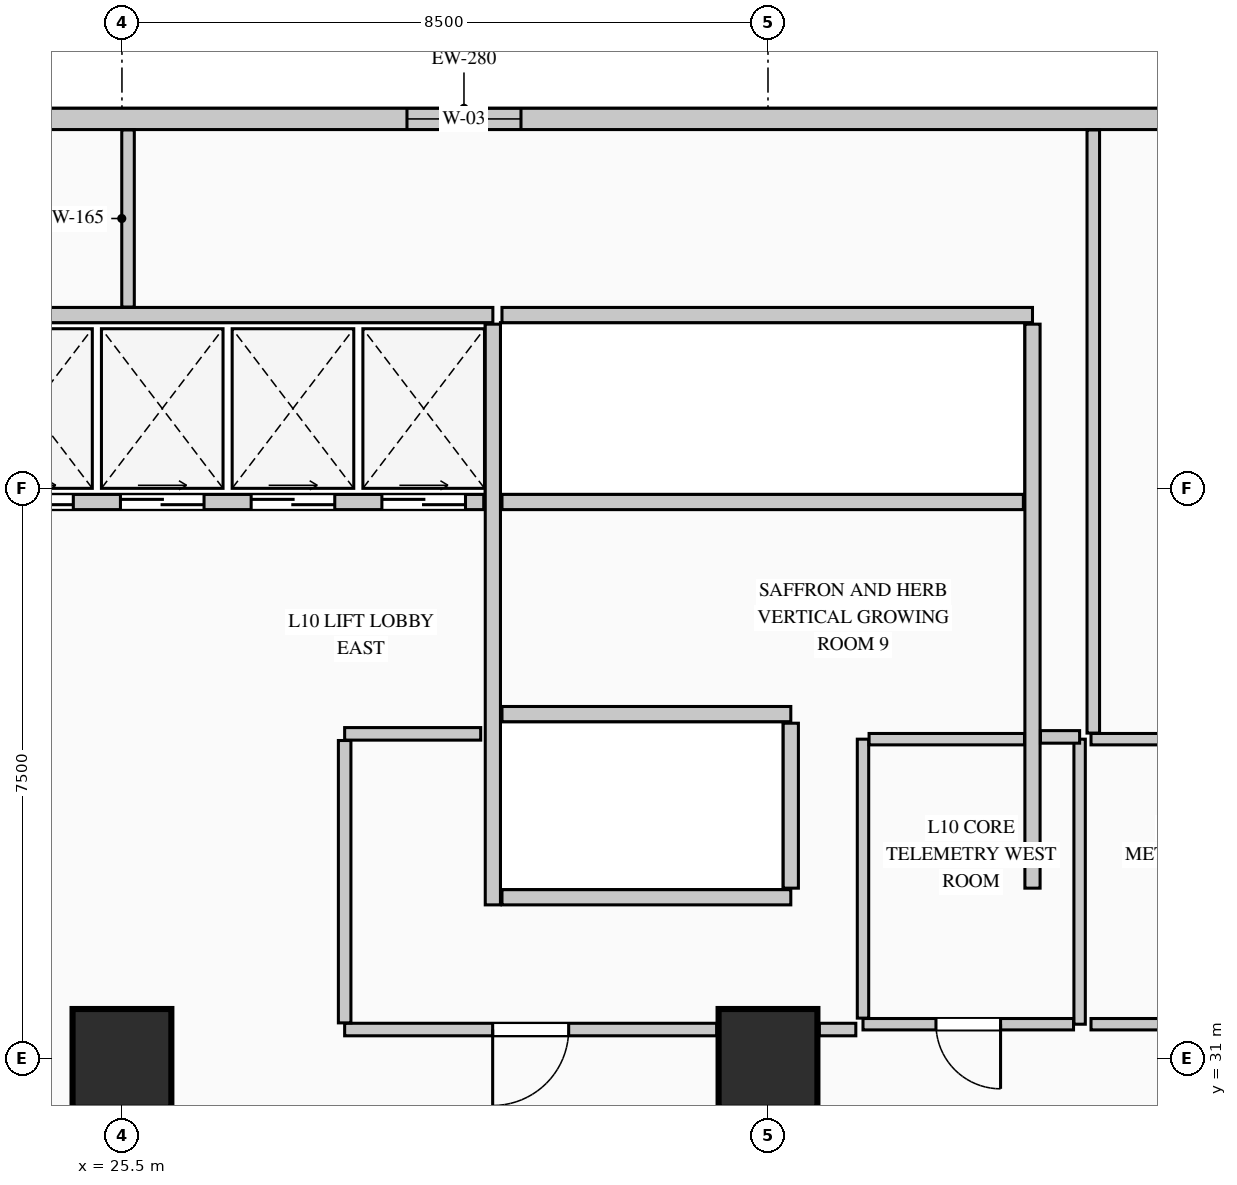
"""IFC4 building model, lengths in metres.
Left out: names, types, materials, properties, quantities, classifications, styles, units other than length and angle.
Written with IfcOpenShell. Run it as: python <this file> out.ifc"""

import sys

from ifc_helpers import new_model, si_unit, direction, frame, frame_2d, origin, origin_2d, place, context, subcontext, project, spatial, rectangle, extrude, element, fill, save


model = new_model("IFC4")
c1 = context("Model", 3, precision=1e-05, world=origin(), true_north=direction((0.0, 1.0)))
c2 = subcontext(c1, "Body", "Model", "MODEL_VIEW")
j1 = project(units=[si_unit("LENGTHUNIT", "METRE"), si_unit("PLANEANGLEUNIT", "RADIAN")], contexts=[c1])
p1 = place(None, origin())
s1 = spatial("IfcSite", under=j1, at=p1, CompositionType="ELEMENT")
p2 = place(p1, origin())
s2 = spatial("IfcBuilding", under=s1, at=p2, CompositionType="ELEMENT")
p3 = place(p2, frame((0.0, 0.0, 44.6)))
s3 = spatial("IfcBuildingStorey", under=s2, at=p3, CompositionType="ELEMENT", Elevation=44.6)
for number, where, z_axis, x_axis in (
    (1, (25.5, 31.0, 0.0), (0.0, 0.0, 1.0), (1.0, 0.0, 0.0)),
    (2, (34.0, 31.0, 0.0), (0.0, 0.0, 1.0), (1.0, 0.0, 0.0)),
):
    element("IfcColumn", number, at=place(p3, frame(where, z_axis=z_axis, x_axis=x_axis)), inside=s3, PredefinedType="COLUMN", context=c2, shape_type="SweptSolid", body=[
        extrude(rectangle(XDim=1.3, YDim=1.3, at=origin_2d()), origin(), (0.0, 0.0, 1.0), 4.4),
    ])
p4 = place(p3, frame((4.84, 43.36, 0.0), z_axis=(0.0, 0.0, 1.0), x_axis=(1.0, 0.0, 0.0)))
e3 = element("IfcWall", 3, at=p4, inside=s3, PredefinedType="STANDARD", context=c2, shape_type="SweptSolid", body=[
    extrude(rectangle(XDim=50.32, YDim=0.28, at=frame_2d((25.16, 0.0))), origin(), (0.0, 0.0, 1.0), 4.1),
])
p5 = place(p4, frame((24.41, 0.0, 0.9)))
e4 = element("IfcOpeningElement", 4, at=p5, cuts=e3, PredefinedType="OPENING", context=c2, shape_type="SweptSolid", body=[
    extrude(rectangle(XDim=1.5, YDim=1.8, at=frame_2d((0.75, 0.9))), frame((0.0, 0.15, 0.0), z_axis=(0.0, -1.0, 0.0), x_axis=(1.0, 0.0, 0.0)), (0.0, 0.0, 1.0), 0.3),
])
p6 = place(p3, frame((23.47, 40.78, 0.0), z_axis=(0.0, 0.0, 1.0), x_axis=(1.0, 0.0, 0.0)))
e5 = element("IfcWall", 5, at=p6, inside=s3, PredefinedType="PARTITIONING", context=c2, shape_type="SweptSolid", body=[
    extrude(rectangle(XDim=6.91, YDim=0.2, at=frame_2d((3.455, 0.0))), origin(), (0.0, 0.0, 1.0), 4.1),
])
p7 = place(p3, frame((30.38, 33.02, 0.0), z_axis=(0.0, 0.0, 1.0), x_axis=(0.0, 1.0, 0.0)))
e6 = element("IfcWall", 6, at=p7, inside=s3, PredefinedType="PARTITIONING", context=c2, shape_type="SweptSolid", body=[
    extrude(rectangle(XDim=7.64, YDim=0.2, at=frame_2d((3.82, 0.0))), origin(), (0.0, 0.0, 1.0), 4.1),
])
p8 = place(p3, frame((23.47, 38.32, 0.0), z_axis=(0.0, 0.0, 1.0), x_axis=(1.0, 0.0, 0.0)))
e7 = element("IfcWall", 7, at=p8, inside=s3, PredefinedType="PARTITIONING", context=c2, shape_type="SweptSolid", body=[
    extrude(rectangle(XDim=6.79, YDim=0.2, at=frame_2d((3.395, 0.0))), origin(), (0.0, 0.0, 1.0), 4.1),
])
p9 = place(p8, frame((0.29, 0.0, 0.0)))
e8 = element("IfcOpeningElement", 8, at=p9, cuts=e7, PredefinedType="OPENING", context=c2, shape_type="SweptSolid", body=[
    extrude(rectangle(XDim=1.1, YDim=2.2, at=frame_2d((0.55, 1.1))), frame((0.0, 0.11, 0.0), z_axis=(0.0, -1.0, 0.0), x_axis=(1.0, 0.0, 0.0)), (0.0, 0.0, 1.0), 0.22),
])
p10 = place(p8, frame((2.01, 0.0, 0.0)))
e9 = element("IfcOpeningElement", 9, at=p10, cuts=e7, PredefinedType="OPENING", context=c2, shape_type="SweptSolid", body=[
    extrude(rectangle(XDim=1.1, YDim=2.2, at=frame_2d((0.55, 1.1))), frame((0.0, 0.11, 0.0), z_axis=(0.0, -1.0, 0.0), x_axis=(1.0, 0.0, 0.0)), (0.0, 0.0, 1.0), 0.22),
])
p11 = place(p8, frame((3.73, 0.0, 0.0)))
e10 = element("IfcOpeningElement", 10, at=p11, cuts=e7, PredefinedType="OPENING", context=c2, shape_type="SweptSolid", body=[
    extrude(rectangle(XDim=1.1, YDim=2.2, at=frame_2d((0.55, 1.1))), frame((0.0, 0.11, 0.0), z_axis=(0.0, -1.0, 0.0), x_axis=(1.0, 0.0, 0.0)), (0.0, 0.0, 1.0), 0.22),
])
p12 = place(p8, frame((5.45, 0.0, 0.0)))
e11 = element("IfcOpeningElement", 11, at=p12, cuts=e7, PredefinedType="OPENING", context=c2, shape_type="SweptSolid", body=[
    extrude(rectangle(XDim=1.1, YDim=2.2, at=frame_2d((0.55, 1.1))), frame((0.0, 0.11, 0.0), z_axis=(0.0, -1.0, 0.0), x_axis=(1.0, 0.0, 0.0)), (0.0, 0.0, 1.0), 0.22),
])
p13 = place(p3, frame((30.5, 40.78, 0.0), z_axis=(0.0, 0.0, 1.0), x_axis=(1.0, 0.0, 0.0)))
e12 = element("IfcWall", 12, at=p13, inside=s3, PredefinedType="PARTITIONING", context=c2, shape_type="SweptSolid", body=[
    extrude(rectangle(XDim=6.98, YDim=0.2, at=frame_2d((3.49, 0.0))), origin(), (0.0, 0.0, 1.0), 4.1),
])
p14 = place(p3, frame((37.48, 33.24, 0.0), z_axis=(0.0, 0.0, 1.0), x_axis=(0.0, 1.0, 0.0)))
e13 = element("IfcWall", 13, at=p14, inside=s3, PredefinedType="PARTITIONING", context=c2, shape_type="SweptSolid", body=[
    extrude(rectangle(XDim=7.42, YDim=0.2, at=frame_2d((3.71, 0.0))), origin(), (0.0, 0.0, 1.0), 4.1),
])
p15 = place(p3, frame((30.5, 38.32, 0.0), z_axis=(0.0, 0.0, 1.0), x_axis=(1.0, 0.0, 0.0)))
e14 = element("IfcWall", 14, at=p15, inside=s3, PredefinedType="PARTITIONING", context=c2, shape_type="SweptSolid", body=[
    extrude(rectangle(XDim=6.86, YDim=0.2, at=frame_2d((3.43, 0.0))), origin(), (0.0, 0.0, 1.0), 4.1),
])
for number, where, z_axis, x_axis in (
    (15, (30.5, 35.53, 0.0), (0.0, 0.0, 1.0), (1.0, 0.0, 0.0)),
    (16, (30.5, 33.12, 0.0), (0.0, 0.0, 1.0), (1.0, 0.0, 0.0)),
):
    element("IfcWall", number, at=place(p3, frame(where, z_axis=z_axis, x_axis=x_axis)), inside=s3, PredefinedType="PARTITIONING", context=c2, shape_type="SweptSolid", body=[
        extrude(rectangle(XDim=3.8, YDim=0.2, at=frame_2d((1.9, 0.0))), origin(), (0.0, 0.0, 1.0), 4.1),
    ])
p16 = place(p3, frame((34.3, 33.24, 0.0), z_axis=(0.0, 0.0, 1.0), x_axis=(0.0, 1.0, 0.0)))
e17 = element("IfcWall", 17, at=p16, inside=s3, PredefinedType="PARTITIONING", context=c2, shape_type="SweptSolid", body=[
    extrude(rectangle(XDim=2.17, YDim=0.2, at=frame_2d((1.085, 0.0))), origin(), (0.0, 0.0, 1.0), 4.1),
])
p17 = place(p3, frame((38.1, 35.2, 0.0), z_axis=(0.0, 0.0, 1.0), x_axis=(0.0, -1.0, 0.0)))
e18 = element("IfcWall", 18, at=p17, inside=s3, PredefinedType="PARTITIONING", context=c2, shape_type="SweptSolid", body=[
    extrude(rectangle(XDim=3.75, YDim=0.15, at=frame_2d((1.875, 0.0))), origin(), (0.0, 0.0, 1.0), 4.1),
])
p18 = place(p3, frame((38.02, 31.45, 0.0), z_axis=(0.0, 0.0, 1.0), x_axis=(-1.0, 0.0, 0.0)))
e19 = element("IfcWall", 19, at=p18, inside=s3, PredefinedType="PARTITIONING", context=c2, shape_type="SweptSolid", body=[
    extrude(rectangle(XDim=2.77, YDim=0.15, at=frame_2d((1.385, 0.0))), origin(), (0.0, 0.0, 1.0), 4.1),
])
p19 = place(p18, frame((0.96, 0.0, 0.0)))
e20 = element("IfcOpeningElement", 20, at=p19, cuts=e19, PredefinedType="OPENING", context=c2, shape_type="SweptSolid", body=[
    extrude(rectangle(XDim=0.85, YDim=2.1, at=frame_2d((0.425, 1.05))), frame((0.0, 0.085, 0.0), z_axis=(0.0, -1.0, 0.0), x_axis=(1.0, 0.0, 0.0)), (0.0, 0.0, 1.0), 0.17),
])
p20 = place(p3, frame((35.25, 31.53, 0.0), z_axis=(0.0, 0.0, 1.0), x_axis=(0.0, 1.0, 0.0)))
e21 = element("IfcWall", 21, at=p20, inside=s3, PredefinedType="PARTITIONING", context=c2, shape_type="SweptSolid", body=[
    extrude(rectangle(XDim=3.67, YDim=0.15, at=frame_2d((1.835, 0.0))), origin(), (0.0, 0.0, 1.0), 4.1),
])
p21 = place(p3, frame((35.33, 35.2, 0.0), z_axis=(0.0, 0.0, 1.0), x_axis=(1.0, 0.0, 0.0)))
e22 = element("IfcWall", 22, at=p21, inside=s3, PredefinedType="PARTITIONING", context=c2, shape_type="SweptSolid", body=[
    extrude(rectangle(XDim=2.045, YDim=0.15, at=frame_2d((1.022, 0.0))), origin(), (0.0, 0.0, 1.0), 4.1),
])
p22 = place(p3, frame((41.07, 31.45, 0.0), z_axis=(0.0, 0.0, 1.0), x_axis=(-1.0, 0.0, 0.0)))
e23 = element("IfcWall", 23, at=p22, inside=s3, PredefinedType="PARTITIONING", context=c2, shape_type="SweptSolid", body=[
    extrude(rectangle(XDim=2.82, YDim=0.15, at=frame_2d((1.41, 0.0))), origin(), (0.0, 0.0, 1.0), 4.1),
])
p23 = place(p22, frame((0.985, 0.0, 0.0)))
e24 = element("IfcOpeningElement", 24, at=p23, cuts=e23, PredefinedType="OPENING", context=c2, shape_type="SweptSolid", body=[
    extrude(rectangle(XDim=0.85, YDim=2.1, at=frame_2d((0.425, 1.05))), frame((0.0, 0.085, 0.0), z_axis=(0.0, -1.0, 0.0), x_axis=(1.0, 0.0, 0.0)), (0.0, 0.0, 1.0), 0.17),
])
p24 = place(p3, frame((38.25, 35.2, 0.0), z_axis=(0.0, 0.0, 1.0), x_axis=(1.0, 0.0, 0.0)))
e25 = element("IfcWall", 25, at=p24, inside=s3, PredefinedType="PARTITIONING", context=c2, shape_type="SweptSolid", body=[
    extrude(rectangle(XDim=2.82, YDim=0.15, at=frame_2d((1.41, 0.0))), origin(), (0.0, 0.0, 1.0), 4.1),
])
p25 = place(p3, frame((38.28, 35.28, 0.0), z_axis=(0.0, 0.0, 1.0), x_axis=(0.0, 1.0, 0.0)))
e26 = element("IfcWall", 26, at=p25, inside=s3, PredefinedType="PARTITIONING", context=c2, shape_type="SweptSolid", body=[
    extrude(rectangle(XDim=7.935, YDim=0.165, at=frame_2d((3.968, 0.0))), origin(), (0.0, 0.0, 1.0), 4.1),
])
p26 = place(p3, frame((28.43, 35.27, 0.0), z_axis=(0.0, 0.0, 1.0), x_axis=(1.0, 0.0, 0.0)))
e27 = element("IfcWall", 27, at=p26, inside=s3, PredefinedType="PARTITIONING", context=c2, shape_type="SweptSolid", body=[
    extrude(rectangle(XDim=1.79, YDim=0.165, at=frame_2d((0.895, 0.0))), origin(), (0.0, 0.0, 1.0), 4.1),
])
p27 = place(p3, frame((25.58, 40.885, 0.0), z_axis=(0.0, 0.0, 1.0), x_axis=(0.0, 1.0, 0.0)))
e28 = element("IfcWall", 28, at=p27, inside=s3, PredefinedType="PARTITIONING", context=c2, shape_type="SweptSolid", body=[
    extrude(rectangle(XDim=2.33, YDim=0.165, at=frame_2d((1.165, 0.0))), origin(), (0.0, 0.0, 1.0), 4.1),
])
p28 = place(p3, frame((38.1, 35.23, 0.0), z_axis=(0.0, 0.0, 1.0), x_axis=(-1.0, 0.0, 0.0)))
e29 = element("IfcWall", 29, at=p28, inside=s3, PredefinedType="PARTITIONING", context=c2, shape_type="SweptSolid", body=[
    extrude(rectangle(XDim=0.515, YDim=0.165, at=frame_2d((0.258, 0.0))), origin(), (0.0, 0.0, 1.0), 4.1),
])
p29 = place(p3, frame((35.156, 31.38, 0.0), z_axis=(0.0, 0.0, 1.0), x_axis=(-1.0, 0.0, 0.0)))
e30 = element("IfcWall", 30, at=p29, inside=s3, PredefinedType="PARTITIONING", context=c2, shape_type="SweptSolid", body=[
    extrude(rectangle(XDim=0.48, YDim=0.165, at=frame_2d((0.24, 0.0))), origin(), (0.0, 0.0, 1.0), 4.1),
])
p30 = place(p3, frame((33.325, 31.38, 0.0), z_axis=(0.0, 0.0, 1.0), x_axis=(-1.0, 0.0, 0.0)))
e31 = element("IfcWall", 31, at=p30, inside=s3, PredefinedType="PARTITIONING", context=c2, shape_type="SweptSolid", body=[
    extrude(rectangle(XDim=4.895, YDim=0.165, at=frame_2d((2.448, 0.0))), origin(), (0.0, 0.0, 1.0), 4.1),
])
p31 = place(p30, frame((1.948, 0.0, 0.0)))
e32 = element("IfcOpeningElement", 32, at=p31, cuts=e31, PredefinedType="OPENING", context=c2, shape_type="SweptSolid", body=[
    extrude(rectangle(XDim=1.0, YDim=2.15, at=frame_2d((0.5, 1.075))), frame((0.0, 0.093, 0.0), z_axis=(0.0, -1.0, 0.0), x_axis=(1.0, 0.0, 0.0)), (0.0, 0.0, 1.0), 0.185),
])
p32 = place(p3, frame((28.43, 31.468, 0.0), z_axis=(0.0, 0.0, 1.0), x_axis=(0.0, 1.0, 0.0)))
e33 = element("IfcWall", 33, at=p32, inside=s3, PredefinedType="PARTITIONING", context=c2, shape_type="SweptSolid", body=[
    extrude(rectangle(XDim=3.715, YDim=0.165, at=frame_2d((1.857, 0.0))), origin(), (0.0, 0.0, 1.0), 4.1),
])
p33 = place(p5, origin())
e34 = element("IfcWindow", 34, at=p33, inside=s3, PartitioningType="SINGLE_PANEL", PredefinedType="WINDOW", context=c2, shape_type="SweptSolid", body=[
    extrude(rectangle(XDim=1.5, YDim=1.8, at=frame_2d((0.75, 0.9))), frame((0.0, 0.03, 0.0), z_axis=(0.0, -1.0, 0.0), x_axis=(1.0, 0.0, 0.0)), (0.0, 0.0, 1.0), 0.06),
])
fill(e4, e34)
p34 = place(p9, origin())
e35 = element("IfcDoor", 35, at=p34, inside=s3, OperationType="DOUBLE_DOOR_SLIDING", PredefinedType="DOOR", context=c2, shape_type="SweptSolid", body=[
    extrude(rectangle(XDim=1.1, YDim=2.2, at=frame_2d((0.55, 1.1))), frame((0.0, 0.025, 0.0), z_axis=(0.0, -1.0, 0.0), x_axis=(1.0, 0.0, 0.0)), (0.0, 0.0, 1.0), 0.05),
])
fill(e8, e35)
p35 = place(p10, origin())
e36 = element("IfcDoor", 36, at=p35, inside=s3, OperationType="DOUBLE_DOOR_SLIDING", PredefinedType="DOOR", context=c2, shape_type="SweptSolid", body=[
    extrude(rectangle(XDim=1.1, YDim=2.2, at=frame_2d((0.55, 1.1))), frame((0.0, 0.025, 0.0), z_axis=(0.0, -1.0, 0.0), x_axis=(1.0, 0.0, 0.0)), (0.0, 0.0, 1.0), 0.05),
])
fill(e9, e36)
p36 = place(p11, origin())
e37 = element("IfcDoor", 37, at=p36, inside=s3, OperationType="DOUBLE_DOOR_SLIDING", PredefinedType="DOOR", context=c2, shape_type="SweptSolid", body=[
    extrude(rectangle(XDim=1.1, YDim=2.2, at=frame_2d((0.55, 1.1))), frame((0.0, 0.025, 0.0), z_axis=(0.0, -1.0, 0.0), x_axis=(1.0, 0.0, 0.0)), (0.0, 0.0, 1.0), 0.05),
])
fill(e10, e37)
p37 = place(p12, origin())
e38 = element("IfcDoor", 38, at=p37, inside=s3, OperationType="DOUBLE_DOOR_SLIDING", PredefinedType="DOOR", context=c2, shape_type="SweptSolid", body=[
    extrude(rectangle(XDim=1.1, YDim=2.2, at=frame_2d((0.55, 1.1))), frame((0.0, 0.025, 0.0), z_axis=(0.0, -1.0, 0.0), x_axis=(1.0, 0.0, 0.0)), (0.0, 0.0, 1.0), 0.05),
])
fill(e11, e38)
p38 = place(p19, origin())
e39 = element("IfcDoor", 39, at=p38, inside=s3, OperationType="SINGLE_SWING_LEFT", PredefinedType="DOOR", context=c2, shape_type="SweptSolid", body=[
    extrude(rectangle(XDim=0.85, YDim=2.1, at=frame_2d((0.425, 1.05))), frame((0.0, 0.025, 0.0), z_axis=(0.0, -1.0, 0.0), x_axis=(1.0, 0.0, 0.0)), (0.0, 0.0, 1.0), 0.05),
])
fill(e20, e39)
p39 = place(p31, origin())
e40 = element("IfcDoor", 40, at=p39, inside=s3, OperationType="SINGLE_SWING_RIGHT", PredefinedType="DOOR", context=c2, shape_type="SweptSolid", body=[
    extrude(rectangle(XDim=1.0, YDim=2.15, at=frame_2d((0.5, 1.075))), frame((0.0, 0.025, 0.0), z_axis=(0.0, -1.0, 0.0), x_axis=(1.0, 0.0, 0.0)), (0.0, 0.0, 1.0), 0.05),
])
fill(e32, e40)
save(model, sys.argv[1])
